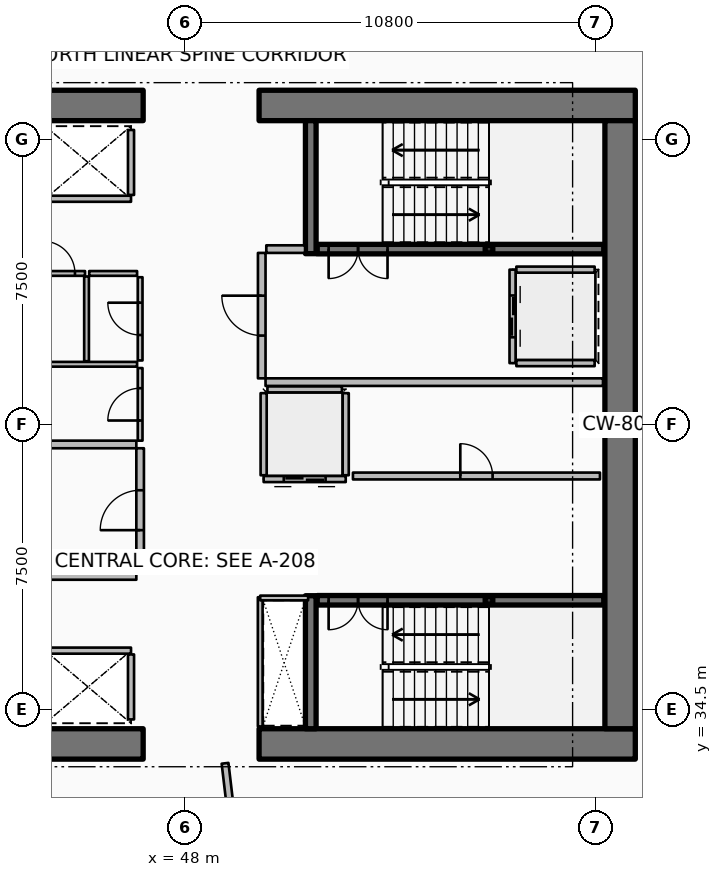
"""IFC4 building model, lengths in metres.
Left out: names, types, materials, properties, quantities, classifications, styles, units other than length and angle.
Written with IfcOpenShell. Run it as: python <this file> out.ifc"""

import sys

from ifc_helpers import new_model, si_unit, direction, frame, frame_2d, origin, origin_2d, place, context, subcontext, project, spatial, rectangle, hollow_rectangle, extrude, element, fill, save


model = new_model("IFC4")
c1 = context("Model", 3, precision=1e-05, world=origin(), true_north=direction((0.0, 1.0)))
c2 = subcontext(c1, "Body", "Model", "MODEL_VIEW")
j1 = project(units=[si_unit("LENGTHUNIT", "METRE"), si_unit("PLANEANGLEUNIT", "RADIAN")], contexts=[c1])
p1 = place(None, origin())
s1 = spatial("IfcSite", under=j1, at=p1, CompositionType="ELEMENT")
p2 = place(p1, origin())
s2 = spatial("IfcBuilding", under=s1, at=p2, CompositionType="ELEMENT")
p3 = place(p2, frame((0.0, 0.0, 146.55)))
s3 = spatial("IfcBuildingStorey", under=s2, at=p3, CompositionType="ELEMENT", Elevation=146.55)
p4 = place(p3, frame((37.0, 33.6, 0.0), z_axis=(0.0, 0.0, 1.0), x_axis=(1.0, 0.0, 0.0)))
e1 = element("IfcWall", 1, at=p4, inside=s3, PredefinedType="SHEAR", context=c2, shape_type="SweptSolid", body=[
    extrude(rectangle(XDim=9.9, YDim=0.8, at=frame_2d((4.95, 0.0))), origin(), (0.0, 0.0, 1.0), 3.75),
])
p5 = place(p3, frame((49.95, 33.6, 0.0), z_axis=(0.0, 0.0, 1.0), x_axis=(1.0, 0.0, 0.0)))
e2 = element("IfcWall", 2, at=p5, inside=s3, PredefinedType="SHEAR", context=c2, shape_type="SweptSolid", body=[
    extrude(rectangle(XDim=9.9, YDim=0.8, at=frame_2d((4.95, 0.0))), origin(), (0.0, 0.0, 1.0), 3.75),
])
p6 = place(p3, frame((37.0, 50.4, 0.0), z_axis=(0.0, 0.0, 1.0), x_axis=(1.0, 0.0, 0.0)))
e3 = element("IfcWall", 3, at=p6, inside=s3, PredefinedType="SHEAR", context=c2, shape_type="SweptSolid", body=[
    extrude(rectangle(XDim=9.9, YDim=0.8, at=frame_2d((4.95, 0.0))), origin(), (0.0, 0.0, 1.0), 3.75),
])
p7 = place(p3, frame((49.95, 50.4, 0.0), z_axis=(0.0, 0.0, 1.0), x_axis=(1.0, 0.0, 0.0)))
e4 = element("IfcWall", 4, at=p7, inside=s3, PredefinedType="SHEAR", context=c2, shape_type="SweptSolid", body=[
    extrude(rectangle(XDim=9.9, YDim=0.8, at=frame_2d((4.95, 0.0))), origin(), (0.0, 0.0, 1.0), 3.75),
])
p8 = place(p3, frame((59.45, 34.0, 0.0), z_axis=(0.0, 0.0, 1.0), x_axis=(0.0, 1.0, 0.0)))
e5 = element("IfcWall", 5, at=p8, inside=s3, PredefinedType="SHEAR", context=c2, shape_type="SweptSolid", body=[
    extrude(rectangle(XDim=16.0, YDim=0.8, at=frame_2d((8.0, 0.0))), origin(), (0.0, 0.0, 1.0), 3.75),
])
for number, where, z_axis, x_axis in (
    (6, (51.31, 46.5, 0.0), (0.0, 0.0, 1.0), (0.0, 1.0, 0.0)),
    (7, (51.31, 34.0, 0.0), (0.0, 0.0, 1.0), (0.0, 1.0, 0.0)),
):
    element("IfcWall", number, at=place(p3, frame(where, z_axis=z_axis, x_axis=x_axis)), inside=s3, PredefinedType="SHEAR", context=c2, shape_type="SweptSolid", body=[
        extrude(rectangle(XDim=3.5, YDim=0.28, at=frame_2d((1.75, 0.0))), origin(), (0.0, 0.0, 1.0), 3.75),
    ])
for number, where, z_axis, x_axis in (
    (8, (56.0, 46.62, 0.0), (0.0, 0.0, 1.0), (1.0, 0.0, 0.0)),
    (9, (56.0, 37.38, 0.0), (0.0, 0.0, 1.0), (1.0, 0.0, 0.0)),
):
    element("IfcColumn", number, at=place(p3, frame(where, z_axis=z_axis, x_axis=x_axis)), inside=s3, PredefinedType="COLUMN", context=c2, shape_type="SweptSolid", body=[
        extrude(hollow_rectangle(XDim=0.2, YDim=0.2, WallThickness=0.01, InnerFilletRadius=0.01, OuterFilletRadius=0.02, at=origin_2d()), origin(), (0.0, 0.0, 1.0), 1.67),
    ])
p9 = place(p3, frame((51.48, 46.62, 0.0), z_axis=(0.0, 0.0, 1.0), x_axis=(1.0, 0.0, 0.0)))
e10 = element("IfcWall", 10, at=p9, inside=s3, PredefinedType="SOLIDWALL", context=c2, shape_type="SweptSolid", body=[
    extrude(rectangle(XDim=7.54, YDim=0.25, at=frame_2d((3.77, 0.0))), origin(), (0.0, 0.0, 1.0), 3.5),
])
p10 = place(p9, frame((0.3, 0.0, 0.0)))
e11 = element("IfcOpeningElement", 11, at=p10, cuts=e10, PredefinedType="OPENING", context=c2, shape_type="SweptSolid", body=[
    extrude(rectangle(XDim=1.55, YDim=2.15, at=frame_2d((0.775, 1.075))), frame((0.0, 0.135, 0.0), z_axis=(0.0, -1.0, 0.0), x_axis=(1.0, 0.0, 0.0)), (0.0, 0.0, 1.0), 0.27),
])
p11 = place(p3, frame((51.48, 37.38, 0.0), z_axis=(0.0, 0.0, 1.0), x_axis=(1.0, 0.0, 0.0)))
e12 = element("IfcWall", 12, at=p11, inside=s3, PredefinedType="SOLIDWALL", context=c2, shape_type="SweptSolid", body=[
    extrude(rectangle(XDim=7.54, YDim=0.25, at=frame_2d((3.77, 0.0))), origin(), (0.0, 0.0, 1.0), 3.5),
])
p12 = place(p11, frame((0.3, 0.0, 0.0)))
e13 = element("IfcOpeningElement", 13, at=p12, cuts=e12, PredefinedType="OPENING", context=c2, shape_type="SweptSolid", body=[
    extrude(rectangle(XDim=1.55, YDim=2.15, at=frame_2d((0.775, 1.075))), frame((0.0, 0.135, 0.0), z_axis=(0.0, -1.0, 0.0), x_axis=(1.0, 0.0, 0.0)), (0.0, 0.0, 1.0), 0.27),
])
p13 = place(p3, frame((46.58, 47.945, 0.0), z_axis=(0.0, 0.0, 1.0), x_axis=(-1.0, 0.0, 0.0)))
e14 = element("IfcWall", 14, at=p13, inside=s3, PredefinedType="PARTITIONING", context=c2, shape_type="SweptSolid", body=[
    extrude(rectangle(XDim=2.26, YDim=0.16, at=frame_2d((1.13, 0.0))), origin(), (0.0, 0.0, 1.0), 3.5),
])
p14 = place(p3, frame((46.58, 48.045, 0.0), z_axis=(0.0, 0.0, 1.0), x_axis=(0.0, 1.0, 0.0)))
e15 = element("IfcWall", 15, at=p14, inside=s3, PredefinedType="PARTITIONING", context=c2, shape_type="SweptSolid", body=[
    extrude(rectangle(XDim=1.71, YDim=0.16, at=frame_2d((0.855, 0.0))), origin(), (0.0, 0.0, 1.0), 3.5),
])
p15 = place(p3, frame((44.32, 36.055, 0.0), z_axis=(0.0, 0.0, 1.0), x_axis=(1.0, 0.0, 0.0)))
e16 = element("IfcWall", 16, at=p15, inside=s3, PredefinedType="PARTITIONING", context=c2, shape_type="SweptSolid", body=[
    extrude(rectangle(XDim=2.26, YDim=0.16, at=frame_2d((1.13, 0.0))), origin(), (0.0, 0.0, 1.0), 3.5),
])
p16 = place(p3, frame((46.58, 34.245, 0.0), z_axis=(0.0, 0.0, 1.0), x_axis=(0.0, 1.0, 0.0)))
e17 = element("IfcWall", 17, at=p16, inside=s3, PredefinedType="PARTITIONING", context=c2, shape_type="SweptSolid", body=[
    extrude(rectangle(XDim=1.71, YDim=0.16, at=frame_2d((0.855, 0.0))), origin(), (0.0, 0.0, 1.0), 3.5),
])
p17 = place(p3, frame((56.62, 46.08, 0.0), z_axis=(0.0, 0.0, 1.0), x_axis=(0.0, -1.0, 0.0)))
e18 = element("IfcWall", 18, at=p17, inside=s3, PredefinedType="PARTITIONING", context=c2, shape_type="SweptSolid", body=[
    extrude(rectangle(XDim=2.46, YDim=0.16, at=frame_2d((1.23, 0.0))), origin(), (0.0, 0.0, 1.0), 3.5),
])
p18 = place(p17, frame((0.68, 0.0, 0.0)))
e19 = element("IfcOpeningElement", 19, at=p18, cuts=e18, PredefinedType="OPENING", context=c2, shape_type="SweptSolid", body=[
    extrude(rectangle(XDim=1.1, YDim=2.1, at=frame_2d((0.55, 1.05))), frame((0.0, 0.09, 0.0), z_axis=(0.0, -1.0, 0.0), x_axis=(1.0, 0.0, 0.0)), (0.0, 0.0, 1.0), 0.18),
])
for number, where, z_axis, x_axis in (
    (20, (56.72, 46.08, 0.0), (0.0, 0.0, 1.0), (1.0, 0.0, 0.0)),
    (21, (56.72, 43.62, 0.0), (0.0, 0.0, 1.0), (1.0, 0.0, 0.0)),
):
    element("IfcWall", number, at=place(p3, frame(where, z_axis=z_axis, x_axis=x_axis)), inside=s3, PredefinedType="PARTITIONING", context=c2, shape_type="SweptSolid", body=[
        extrude(rectangle(XDim=2.06, YDim=0.16, at=frame_2d((1.03, 0.0))), origin(), (0.0, 0.0, 1.0), 3.5),
    ])
p19 = place(p3, frame((52.23, 40.57, 0.0), z_axis=(0.0, 0.0, 1.0), x_axis=(-1.0, 0.0, 0.0)))
e22 = element("IfcWall", 22, at=p19, inside=s3, PredefinedType="PARTITIONING", context=c2, shape_type="SweptSolid", body=[
    extrude(rectangle(XDim=2.16, YDim=0.16, at=frame_2d((1.08, 0.0))), origin(), (0.0, 0.0, 1.0), 3.5),
])
p20 = place(p19, frame((0.53, 0.0, 0.0)))
e23 = element("IfcOpeningElement", 23, at=p20, cuts=e22, PredefinedType="OPENING", context=c2, shape_type="SweptSolid", body=[
    extrude(rectangle(XDim=1.1, YDim=2.1, at=frame_2d((0.55, 1.05))), frame((0.0, 0.09, 0.0), z_axis=(0.0, -1.0, 0.0), x_axis=(1.0, 0.0, 0.0)), (0.0, 0.0, 1.0), 0.18),
])
for number, where, z_axis, x_axis in (
    (24, (52.23, 40.67, 0.0), (0.0, 0.0, 1.0), (0.0, 1.0, 0.0)),
    (25, (50.07, 40.67, 0.0), (0.0, 0.0, 1.0), (0.0, 1.0, 0.0)),
):
    element("IfcWall", number, at=place(p3, frame(where, z_axis=z_axis, x_axis=x_axis)), inside=s3, PredefinedType="PARTITIONING", context=c2, shape_type="SweptSolid", body=[
        extrude(rectangle(XDim=2.16, YDim=0.16, at=frame_2d((1.08, 0.0))), origin(), (0.0, 0.0, 1.0), 3.5),
    ])
p21 = place(p3, frame((50.17, 42.93, 0.0), z_axis=(0.0, 0.0, 1.0), x_axis=(1.0, 0.0, 0.0)))
e26 = element("IfcWall", 26, at=p21, inside=s3, PredefinedType="PARTITIONING", context=c2, shape_type="SweptSolid", body=[
    extrude(rectangle(XDim=1.96, YDim=0.16, at=frame_2d((0.98, 0.0))), origin(), (0.0, 0.0, 1.0), 3.5),
])
p22 = place(p3, frame((52.42, 40.65, 0.0), z_axis=(0.0, 0.0, 1.0), x_axis=(1.0, 0.0, 0.0)))
e27 = element("IfcWall", 27, at=p22, inside=s3, PredefinedType="PARTITIONING", context=c2, shape_type="SweptSolid", body=[
    extrude(rectangle(XDim=6.5, YDim=0.18, at=frame_2d((3.25, 0.0))), origin(), (0.0, 0.0, 1.0), 3.5),
])
p23 = place(p22, frame((2.825, 0.0, 0.0)))
e28 = element("IfcOpeningElement", 28, at=p23, cuts=e27, PredefinedType="OPENING", context=c2, shape_type="SweptSolid", body=[
    extrude(rectangle(XDim=0.85, YDim=2.06, at=frame_2d((0.425, 1.03))), frame((0.0, 0.1, 0.0), z_axis=(0.0, -1.0, 0.0), x_axis=(1.0, 0.0, 0.0)), (0.0, 0.0, 1.0), 0.2),
])
p24 = place(p3, frame((41.35, 38.02, 0.0), z_axis=(0.0, 0.0, 1.0), x_axis=(1.0, 0.0, 0.0)))
e29 = element("IfcWall", 29, at=p24, inside=s3, PredefinedType="PARTITIONING", context=c2, shape_type="SweptSolid", body=[
    extrude(rectangle(XDim=5.37, YDim=0.2, at=frame_2d((2.685, 0.0))), origin(), (0.0, 0.0, 1.0), 3.5),
])
p25 = place(p3, frame((43.92, 41.48, 0.0), z_axis=(0.0, 0.0, 1.0), x_axis=(1.0, 0.0, 0.0)))
e30 = element("IfcWall", 30, at=p25, inside=s3, PredefinedType="PARTITIONING", context=c2, shape_type="SweptSolid", body=[
    extrude(rectangle(XDim=2.8, YDim=0.2, at=frame_2d((1.4, 0.0))), origin(), (0.0, 0.0, 1.0), 3.5),
])
p26 = place(p3, frame((46.82, 38.12, 0.0), z_axis=(0.0, 0.0, 1.0), x_axis=(0.0, 1.0, 0.0)))
e31 = element("IfcWall", 31, at=p26, inside=s3, PredefinedType="PARTITIONING", context=c2, shape_type="SweptSolid", body=[
    extrude(rectangle(XDim=3.26, YDim=0.2, at=frame_2d((1.63, 0.0))), origin(), (0.0, 0.0, 1.0), 3.5),
])
p27 = place(p26, frame((1.105, 0.0, 0.0)))
e32 = element("IfcOpeningElement", 32, at=p27, cuts=e31, PredefinedType="OPENING", context=c2, shape_type="SweptSolid", body=[
    extrude(rectangle(XDim=1.05, YDim=2.1, at=frame_2d((0.525, 1.05))), frame((0.0, 0.11, 0.0), z_axis=(0.0, -1.0, 0.0), x_axis=(1.0, 0.0, 0.0)), (0.0, 0.0, 1.0), 0.22),
])
p28 = place(p3, frame((50.12, 43.12, 0.0), z_axis=(0.0, 0.0, 1.0), x_axis=(1.0, 0.0, 0.0)))
e33 = element("IfcWall", 33, at=p28, inside=s3, PredefinedType="PARTITIONING", context=c2, shape_type="SweptSolid", body=[
    extrude(rectangle(XDim=8.88, YDim=0.2, at=frame_2d((4.44, 0.0))), origin(), (0.0, 0.0, 1.0), 3.5),
])
p29 = place(p3, frame((50.14, 46.62, 0.0), z_axis=(0.0, 0.0, 1.0), x_axis=(1.0, 0.0, 0.0)))
e34 = element("IfcWall", 34, at=p29, inside=s3, PredefinedType="PARTITIONING", context=c2, shape_type="SweptSolid", body=[
    extrude(rectangle(XDim=1.02, YDim=0.2, at=frame_2d((0.51, 0.0))), origin(), (0.0, 0.0, 1.0), 3.5),
])
p30 = place(p3, frame((50.02, 43.22, 0.0), z_axis=(0.0, 0.0, 1.0), x_axis=(0.0, 1.0, 0.0)))
e35 = element("IfcWall", 35, at=p30, inside=s3, PredefinedType="PARTITIONING", context=c2, shape_type="SweptSolid", body=[
    extrude(rectangle(XDim=3.3, YDim=0.2, at=frame_2d((1.65, 0.0))), origin(), (0.0, 0.0, 1.0), 3.5),
])
p31 = place(p30, frame((1.125, 0.0, 0.0)))
e36 = element("IfcOpeningElement", 36, at=p31, cuts=e35, PredefinedType="OPENING", context=c2, shape_type="SweptSolid", body=[
    extrude(rectangle(XDim=1.05, YDim=2.1, at=frame_2d((0.525, 1.05))), frame((0.0, 0.11, 0.0), z_axis=(0.0, -1.0, 0.0), x_axis=(1.0, 0.0, 0.0)), (0.0, 0.0, 1.0), 0.22),
])
p32 = place(p3, frame((49.98, 34.06, 0.0), z_axis=(0.0, 0.0, 1.0), x_axis=(0.0, 1.0, 0.0)))
e37 = element("IfcWall", 37, at=p32, inside=s3, PredefinedType="PARTITIONING", context=c2, shape_type="SweptSolid", body=[
    extrude(rectangle(XDim=3.4, YDim=0.125, at=frame_2d((1.7, 0.0))), origin(), (0.0, 0.0, 1.0), 2.94),
])
p33 = place(p3, frame((49.98, 37.44, 0.0), z_axis=(0.0, 0.0, 1.0), x_axis=(1.0, 0.0, 0.0)))
e38 = element("IfcWall", 38, at=p33, inside=s3, PredefinedType="PARTITIONING", context=c2, shape_type="SweptSolid", body=[
    extrude(rectangle(XDim=1.26, YDim=0.125, at=frame_2d((0.63, 0.0))), origin(), (0.0, 0.0, 1.0), 2.94),
])
p34 = place(p3, frame((44.03, 43.59, 0.0), z_axis=(0.0, 0.0, 1.0), x_axis=(1.0, 0.0, 0.0)))
e39 = element("IfcWall", 39, at=p34, inside=s3, PredefinedType="PARTITIONING", context=c2, shape_type="SweptSolid", body=[
    extrude(rectangle(XDim=2.71, YDim=0.125, at=frame_2d((1.355, 0.0))), origin(), (0.0, 0.0, 1.0), 2.94),
])
p35 = place(p3, frame((45.41, 43.67, 0.0), z_axis=(0.0, 0.0, 1.0), x_axis=(0.0, 1.0, 0.0)))
e40 = element("IfcWall", 40, at=p35, inside=s3, PredefinedType="PARTITIONING", context=c2, shape_type="SweptSolid", body=[
    extrude(rectangle(XDim=2.23, YDim=0.125, at=frame_2d((1.115, 0.0))), origin(), (0.0, 0.0, 1.0), 2.94),
])
p36 = place(p3, frame((46.82, 41.58, 0.0), z_axis=(0.0, 0.0, 1.0), x_axis=(0.0, 1.0, 0.0)))
e41 = element("IfcWall", 41, at=p36, inside=s3, PredefinedType="PARTITIONING", context=c2, shape_type="SweptSolid", body=[
    extrude(rectangle(XDim=1.91, YDim=0.125, at=frame_2d((0.955, 0.0))), origin(), (0.0, 0.0, 1.0), 2.94),
])
p37 = place(p36, frame((0.53, 0.0, 0.0)))
e42 = element("IfcOpeningElement", 42, at=p37, cuts=e41, PredefinedType="OPENING", context=c2, shape_type="SweptSolid", body=[
    extrude(rectangle(XDim=0.85, YDim=2.06, at=frame_2d((0.425, 1.03))), frame((0.0, 0.073, 0.0), z_axis=(0.0, -1.0, 0.0), x_axis=(1.0, 0.0, 0.0)), (0.0, 0.0, 1.0), 0.145),
])
p38 = place(p3, frame((46.82, 43.69, 0.0), z_axis=(0.0, 0.0, 1.0), x_axis=(0.0, 1.0, 0.0)))
e43 = element("IfcWall", 43, at=p38, inside=s3, PredefinedType="PARTITIONING", context=c2, shape_type="SweptSolid", body=[
    extrude(rectangle(XDim=2.19, YDim=0.125, at=frame_2d((1.095, 0.0))), origin(), (0.0, 0.0, 1.0), 2.94),
])
p39 = place(p38, frame((0.67, 0.0, 0.0)))
e44 = element("IfcOpeningElement", 44, at=p39, cuts=e43, PredefinedType="OPENING", context=c2, shape_type="SweptSolid", body=[
    extrude(rectangle(XDim=0.85, YDim=2.06, at=frame_2d((0.425, 1.03))), frame((0.0, 0.073, 0.0), z_axis=(0.0, -1.0, 0.0), x_axis=(1.0, 0.0, 0.0)), (0.0, 0.0, 1.0), 0.145),
])
p40 = place(p3, frame((43.99, 45.98, 0.0), z_axis=(0.0, 0.0, 1.0), x_axis=(1.0, 0.0, 0.0)))
e45 = element("IfcWall", 45, at=p40, inside=s3, PredefinedType="PARTITIONING", context=c2, shape_type="SweptSolid", body=[
    extrude(rectangle(XDim=1.38, YDim=0.125, at=frame_2d((0.69, 0.0))), origin(), (0.0, 0.0, 1.0), 2.94),
])
p41 = place(p40, frame((0.265, 0.0, 0.0)))
e46 = element("IfcOpeningElement", 46, at=p41, cuts=e45, PredefinedType="OPENING", context=c2, shape_type="SweptSolid", body=[
    extrude(rectangle(XDim=0.85, YDim=2.06, at=frame_2d((0.425, 1.03))), frame((0.0, 0.073, 0.0), z_axis=(0.0, -1.0, 0.0), x_axis=(1.0, 0.0, 0.0)), (0.0, 0.0, 1.0), 0.145),
])
p42 = place(p3, frame((45.48, 45.98, 0.0), z_axis=(0.0, 0.0, 1.0), x_axis=(1.0, 0.0, 0.0)))
e47 = element("IfcWall", 47, at=p42, inside=s3, PredefinedType="PARTITIONING", context=c2, shape_type="SweptSolid", body=[
    extrude(rectangle(XDim=1.26, YDim=0.125, at=frame_2d((0.63, 0.0))), origin(), (0.0, 0.0, 1.0), 2.94),
])
p43 = place(p3, frame((49.054, 33.091, 0.0), z_axis=(0.0, 0.0, 1.0), x_axis=(0.117543744731, -0.993067705685, 0.0)))
e48 = element("IfcWall", 48, at=p43, inside=s3, PredefinedType="PARTITIONING", context=c2, shape_type="SweptSolid", body=[
    extrude(rectangle(XDim=12.763, YDim=0.18, at=frame_2d((6.382, 0.0))), origin(), (0.0, 0.0, 1.0), 2.94),
])
p44 = place(p3, frame((64.017, 51.093, 0.0), z_axis=(0.0, 0.0, 1.0), x_axis=(-0.649447060425, 0.76040680935, 0.0)))
e49 = element("IfcWall", 49, at=p44, inside=s3, PredefinedType="PARTITIONING", context=c2, shape_type="SweptSolid", body=[
    extrude(rectangle(XDim=6.975, YDim=0.125, at=frame_2d((3.487, 0.0))), origin(), (0.0, 0.0, 1.0), 2.94),
])
p45 = place(p44, frame((3.037, 0.0, 0.0)))
e50 = element("IfcOpeningElement", 50, at=p45, cuts=e49, PredefinedType="OPENING", context=c2, shape_type="SweptSolid", body=[
    extrude(rectangle(XDim=0.9, YDim=2.08, at=frame_2d((0.45, 1.04))), frame((0.0, 0.073, 0.0), z_axis=(0.0, -1.0, 0.0), x_axis=(1.0, 0.0, 0.0)), (0.0, 0.0, 1.0), 0.145),
])
p46 = place(p10, origin())
e51 = element("IfcDoor", 51, at=p46, inside=s3, OperationType="DOUBLE_DOOR_SINGLE_SWING", PredefinedType="DOOR", context=c2, shape_type="SweptSolid", body=[
    extrude(rectangle(XDim=1.55, YDim=2.15, at=frame_2d((0.775, 1.075))), frame((0.0, 0.025, 0.0), z_axis=(0.0, -1.0, 0.0), x_axis=(1.0, 0.0, 0.0)), (0.0, 0.0, 1.0), 0.05),
])
fill(e11, e51)
p47 = place(p12, origin())
e52 = element("IfcDoor", 52, at=p47, inside=s3, OperationType="DOUBLE_DOOR_SINGLE_SWING", PredefinedType="DOOR", context=c2, shape_type="SweptSolid", body=[
    extrude(rectangle(XDim=1.55, YDim=2.15, at=frame_2d((0.775, 1.075))), frame((0.0, 0.025, 0.0), z_axis=(0.0, -1.0, 0.0), x_axis=(1.0, 0.0, 0.0)), (0.0, 0.0, 1.0), 0.05),
])
fill(e13, e52)
p48 = place(p18, origin())
e53 = element("IfcDoor", 53, at=p48, inside=s3, OperationType="DOUBLE_DOOR_SLIDING", PredefinedType="DOOR", context=c2, shape_type="SweptSolid", body=[
    extrude(rectangle(XDim=1.1, YDim=2.1, at=frame_2d((0.55, 1.05))), frame((0.0, 0.025, 0.0), z_axis=(0.0, -1.0, 0.0), x_axis=(1.0, 0.0, 0.0)), (0.0, 0.0, 1.0), 0.05),
])
fill(e19, e53)
p49 = place(p20, origin())
e54 = element("IfcDoor", 54, at=p49, inside=s3, OperationType="DOUBLE_DOOR_SLIDING", PredefinedType="DOOR", context=c2, shape_type="SweptSolid", body=[
    extrude(rectangle(XDim=1.1, YDim=2.1, at=frame_2d((0.55, 1.05))), frame((0.0, 0.025, 0.0), z_axis=(0.0, -1.0, 0.0), x_axis=(1.0, 0.0, 0.0)), (0.0, 0.0, 1.0), 0.05),
])
fill(e23, e54)
p50 = place(p23, origin())
e55 = element("IfcDoor", 55, at=p50, inside=s3, OperationType="SINGLE_SWING_LEFT", PredefinedType="DOOR", context=c2, shape_type="SweptSolid", body=[
    extrude(rectangle(XDim=0.85, YDim=2.06, at=frame_2d((0.425, 1.03))), frame((0.0, 0.025, 0.0), z_axis=(0.0, -1.0, 0.0), x_axis=(1.0, 0.0, 0.0)), (0.0, 0.0, 1.0), 0.05),
])
fill(e28, e55)
p51 = place(p27, origin())
e56 = element("IfcDoor", 56, at=p51, inside=s3, OperationType="SINGLE_SWING_LEFT", PredefinedType="DOOR", context=c2, shape_type="SweptSolid", body=[
    extrude(rectangle(XDim=1.05, YDim=2.1, at=frame_2d((0.525, 1.05))), frame((0.0, 0.025, 0.0), z_axis=(0.0, -1.0, 0.0), x_axis=(1.0, 0.0, 0.0)), (0.0, 0.0, 1.0), 0.05),
])
fill(e32, e56)
p52 = place(p31, origin())
e57 = element("IfcDoor", 57, at=p52, inside=s3, OperationType="SINGLE_SWING_RIGHT", PredefinedType="DOOR", context=c2, shape_type="SweptSolid", body=[
    extrude(rectangle(XDim=1.05, YDim=2.1, at=frame_2d((0.525, 1.05))), frame((0.0, 0.025, 0.0), z_axis=(0.0, -1.0, 0.0), x_axis=(1.0, 0.0, 0.0)), (0.0, 0.0, 1.0), 0.05),
])
fill(e36, e57)
p53 = place(p37, origin())
e58 = element("IfcDoor", 58, at=p53, inside=s3, OperationType="SINGLE_SWING_LEFT", PredefinedType="DOOR", context=c2, shape_type="SweptSolid", body=[
    extrude(rectangle(XDim=0.85, YDim=2.06, at=frame_2d((0.425, 1.03))), frame((0.0, 0.025, 0.0), z_axis=(0.0, -1.0, 0.0), x_axis=(1.0, 0.0, 0.0)), (0.0, 0.0, 1.0), 0.05),
])
fill(e42, e58)
p54 = place(p39, origin())
e59 = element("IfcDoor", 59, at=p54, inside=s3, OperationType="SINGLE_SWING_RIGHT", PredefinedType="DOOR", context=c2, shape_type="SweptSolid", body=[
    extrude(rectangle(XDim=0.85, YDim=2.06, at=frame_2d((0.425, 1.03))), frame((0.0, 0.025, 0.0), z_axis=(0.0, -1.0, 0.0), x_axis=(1.0, 0.0, 0.0)), (0.0, 0.0, 1.0), 0.05),
])
fill(e44, e59)
p55 = place(p41, origin())
e60 = element("IfcDoor", 60, at=p55, inside=s3, OperationType="SINGLE_SWING_LEFT", PredefinedType="DOOR", context=c2, shape_type="SweptSolid", body=[
    extrude(rectangle(XDim=0.85, YDim=2.06, at=frame_2d((0.425, 1.03))), frame((0.0, 0.025, 0.0), z_axis=(0.0, -1.0, 0.0), x_axis=(1.0, 0.0, 0.0)), (0.0, 0.0, 1.0), 0.05),
])
fill(e46, e60)
save(model, sys.argv[1])
